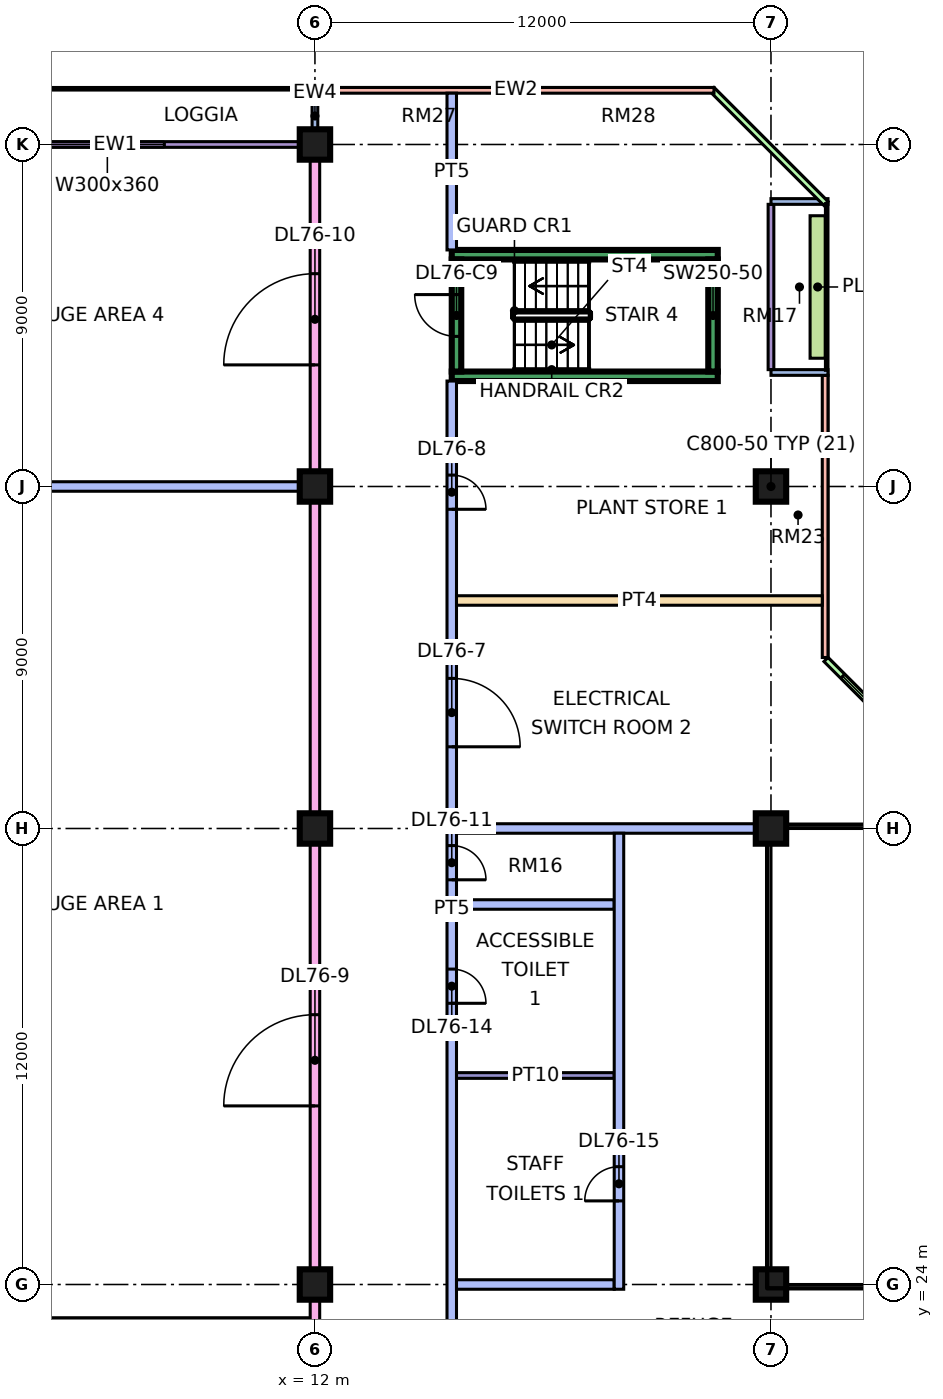
"""IFC4 building model, lengths in metres.
Left out: names, types, materials, properties, quantities, classifications, styles, units other than length and angle.
Written with IfcOpenShell. Run it as: python <this file> out.ifc"""

import sys

from ifc_helpers import new_model, si_unit, direction, frame, frame_2d, origin, origin_2d, place, context, subcontext, project, spatial, rectangle, extrude, element, fill, save


model = new_model("IFC4")
c1 = context("Model", 3, precision=1e-05, world=origin(), true_north=direction((0.0, 1.0)))
c2 = subcontext(c1, "Body", "Model", "MODEL_VIEW")
j1 = project(units=[si_unit("LENGTHUNIT", "METRE"), si_unit("PLANEANGLEUNIT", "RADIAN")], contexts=[c1])
p1 = place(None, origin())
s1 = spatial("IfcSite", under=j1, at=p1, CompositionType="ELEMENT")
p2 = place(p1, origin())
s2 = spatial("IfcBuilding", under=s1, at=p2, CompositionType="ELEMENT")
p3 = place(p2, frame((0.0, 0.0, 322.15)))
s3 = spatial("IfcBuildingStorey", under=s2, at=p3, CompositionType="ELEMENT", Elevation=322.15)
for number, where, z_axis, x_axis in (
    (1, (12.0, 24.0, 0.0), (0.0, 0.0, 1.0), (1.0, 0.0, 0.0)),
    (2, (12.0, 36.0, 0.0), (0.0, 0.0, 1.0), (1.0, 0.0, 0.0)),
    (3, (12.0, 45.0, 0.0), (0.0, 0.0, 1.0), (1.0, 0.0, 0.0)),
    (4, (12.0, 54.0, 0.0), (0.0, 0.0, 1.0), (1.0, 0.0, 0.0)),
    (5, (24.0, 24.0, 0.0), (0.0, 0.0, 1.0), (1.0, 0.0, 0.0)),
    (6, (24.0, 36.0, 0.0), (0.0, 0.0, 1.0), (1.0, 0.0, 0.0)),
    (7, (24.0, 45.0, 0.0), (0.0, 0.0, 1.0), (1.0, 0.0, 0.0)),
):
    element("IfcColumn", number, at=place(p3, frame(where, z_axis=z_axis, x_axis=x_axis)), inside=s3, PredefinedType="COLUMN", context=c2, shape_type="SweptSolid", body=[
        extrude(rectangle(XDim=0.8, YDim=0.8, at=origin_2d()), origin(), (0.0, 0.0, 1.0), 5.5),
    ])
for number, where, z_axis, x_axis in (
    (8, (15.6, 47.9, 0.0), (0.0, 0.0, 1.0), (1.0, 0.0, 0.0)),
    (9, (15.6, 51.1, 0.0), (0.0, 0.0, 1.0), (1.0, 0.0, 0.0)),
):
    element("IfcWall", number, at=place(p3, frame(where, z_axis=z_axis, x_axis=x_axis)), inside=s3, PredefinedType="SHEAR", context=c2, shape_type="SweptSolid", body=[
        extrude(rectangle(XDim=7.0, YDim=0.25, at=frame_2d((3.5, 0.0))), origin(), (0.0, 0.0, 1.0), 5.5),
    ])
p4 = place(p3, frame((15.725, 48.025, 0.0), z_axis=(0.0, 0.0, 1.0), x_axis=(0.0, 1.0, 0.0)))
e10 = element("IfcWall", 10, at=p4, inside=s3, PredefinedType="SHEAR", context=c2, shape_type="SweptSolid", body=[
    extrude(rectangle(XDim=2.95, YDim=0.25, at=frame_2d((1.475, 0.0))), origin(), (0.0, 0.0, 1.0), 5.5),
])
p5 = place(p4, frame((0.925, 0.0, 0.0)))
e11 = element("IfcOpeningElement", 11, at=p5, cuts=e10, PredefinedType="OPENING", context=c2, shape_type="SweptSolid", body=[
    extrude(rectangle(XDim=1.1, YDim=2.2, at=frame_2d((0.55, 1.1))), frame((0.0, 0.135, 0.0), z_axis=(0.0, -1.0, 0.0), x_axis=(1.0, 0.0, 0.0)), (0.0, 0.0, 1.0), 0.27),
])
p6 = place(p3, frame((22.475, 48.025, 0.0), z_axis=(0.0, 0.0, 1.0), x_axis=(0.0, 1.0, 0.0)))
e12 = element("IfcWall", 12, at=p6, inside=s3, PredefinedType="SHEAR", context=c2, shape_type="SweptSolid", body=[
    extrude(rectangle(XDim=2.95, YDim=0.25, at=frame_2d((1.475, 0.0))), origin(), (0.0, 0.0, 1.0), 5.5),
])
p7 = place(p3, frame((28.447, 37.447, 0.0), z_axis=(0.0, 0.0, 1.0), x_axis=(-0.707106781187, 0.707106781187, 0.0)))
e13 = element("IfcWall", 13, at=p7, inside=s3, PredefinedType="SOLIDWALL", context=c2, shape_type="SweptSolid", body=[
    extrude(rectangle(XDim=4.243, YDim=0.15, at=frame_2d((2.121, 0.0))), origin(), (0.0, 0.0, 1.0), 5.05),
])
p8 = place(p7, frame((0.621, 0.0, 0.45)))
e14 = element("IfcOpeningElement", 14, at=p8, cuts=e13, PredefinedType="OPENING", context=c2, shape_type="SweptSolid", body=[
    extrude(rectangle(XDim=3.0, YDim=3.6, at=frame_2d((1.5, 1.8))), frame((0.0, 0.085, 0.0), z_axis=(0.0, -1.0, 0.0), x_axis=(1.0, 0.0, 0.0)), (0.0, 0.0, 1.0), 0.17),
])
p9 = place(p3, frame((25.425, 40.5, 0.0), z_axis=(0.0, 0.0, 1.0), x_axis=(0.0, 1.0, 0.0)))
e15 = element("IfcWall", 15, at=p9, inside=s3, PredefinedType="SOLIDWALL", context=c2, shape_type="SweptSolid", body=[
    extrude(rectangle(XDim=7.425, YDim=0.15, at=frame_2d((3.712, 0.0))), origin(), (0.0, 0.0, 1.0), 5.05),
])
p10 = place(p3, frame((24.0, 48.075, 0.0), z_axis=(0.0, 0.0, 1.0), x_axis=(0.0, 1.0, 0.0)))
e16 = element("IfcWall", 16, at=p10, inside=s3, PredefinedType="SOLIDWALL", context=c2, shape_type="SweptSolid", body=[
    extrude(rectangle(XDim=4.35, YDim=0.15, at=frame_2d((2.175, 0.0))), origin(), (0.0, 0.0, 1.0), 5.05),
])
for number, where, z_axis, x_axis in (
    (17, (25.5, 48.0, 0.0), (0.0, 0.0, 1.0), (-1.0, 0.0, 0.0)),
    (18, (25.5, 52.5, 0.0), (0.0, 0.0, 1.0), (-1.0, 0.0, 0.0)),
):
    element("IfcWall", number, at=place(p3, frame(where, z_axis=z_axis, x_axis=x_axis)), inside=s3, PredefinedType="SOLIDWALL", context=c2, shape_type="SweptSolid", body=[
        extrude(rectangle(XDim=1.5, YDim=0.15, at=frame_2d((0.75, 0.0))), origin(), (0.0, 0.0, 1.0), 5.05),
    ])
p11 = place(p3, frame((25.447, 52.447, 0.0), z_axis=(0.0, 0.0, 1.0), x_axis=(-0.707106781187, 0.707106781187, 0.0)))
e19 = element("IfcWall", 19, at=p11, inside=s3, PredefinedType="SOLIDWALL", context=c2, shape_type="SweptSolid", body=[
    extrude(rectangle(XDim=4.243, YDim=0.15, at=frame_2d((2.121, 0.0))), origin(), (0.0, 0.0, 1.0), 5.05),
])
p12 = place(p3, frame((22.5, 55.425, 0.0), z_axis=(0.0, 0.0, 1.0), x_axis=(-1.0, 0.0, 0.0)))
e20 = element("IfcWall", 20, at=p12, inside=s3, PredefinedType="SOLIDWALL", context=c2, shape_type="SweptSolid", body=[
    extrude(rectangle(XDim=10.425, YDim=0.15, at=frame_2d((5.212, 0.0))), origin(), (0.0, 0.0, 1.0), 5.05),
])
p13 = place(p3, frame((11.925, 54.0, 0.0), z_axis=(0.0, 0.0, 1.0), x_axis=(-1.0, 0.0, 0.0)))
e21 = element("IfcWall", 21, at=p13, inside=s3, PredefinedType="SOLIDWALL", context=c2, shape_type="SweptSolid", body=[
    extrude(rectangle(XDim=10.35, YDim=0.15, at=frame_2d((5.175, 0.0))), origin(), (0.0, 0.0, 1.0), 5.05),
])
p14 = place(p13, frame((3.887, 0.0, 0.45)))
e22 = element("IfcOpeningElement", 22, at=p14, cuts=e21, PredefinedType="OPENING", context=c2, shape_type="SweptSolid", body=[
    extrude(rectangle(XDim=3.0, YDim=3.6, at=frame_2d((1.5, 1.8))), frame((0.0, 0.085, 0.0), z_axis=(0.0, -1.0, 0.0), x_axis=(1.0, 0.0, 0.0)), (0.0, 0.0, 1.0), 0.17),
])
p15 = place(p3, frame((12.0, 55.5, 0.0), z_axis=(0.0, 0.0, 1.0), x_axis=(0.0, -1.0, 0.0)))
e23 = element("IfcWall", 23, at=p15, inside=s3, PredefinedType="SOLIDWALL", context=c2, shape_type="SweptSolid", body=[
    extrude(rectangle(XDim=1.5, YDim=0.15, at=frame_2d((0.75, 0.0))), origin(), (0.0, 0.0, 1.0), 5.05),
])
p16 = place(p3, frame((25.229, 48.375, 0.0), z_axis=(0.0, 0.0, 1.0), x_axis=(0.0, 1.0, 0.0)))
e24 = element("IfcWall", 24, at=p16, inside=s3, PredefinedType="SOLIDWALL", context=c2, shape_type="SweptSolid", body=[
    extrude(rectangle(XDim=3.75, YDim=0.4, at=frame_2d((1.875, 0.0))), origin(), (0.0, 0.0, 1.0), 0.7),
])
p17 = place(p3, frame((-1.35, 23.0, 0.0), z_axis=(0.0, 0.0, 1.0), x_axis=(1.0, 0.0, 0.0)))
e25 = element("IfcWall", 25, at=p17, inside=s3, PredefinedType="PARTITIONING", context=c2, shape_type="SweptSolid", body=[
    extrude(rectangle(XDim=13.225, YDim=0.25, at=frame_2d((6.613, 0.0))), origin(), (0.0, 0.0, 1.0), 5.05),
])
p18 = place(p3, frame((0.0, 45.0, 0.0), z_axis=(0.0, 0.0, 1.0), x_axis=(1.0, 0.0, 0.0)))
e26 = element("IfcWall", 26, at=p18, inside=s3, PredefinedType="PARTITIONING", context=c2, shape_type="SweptSolid", body=[
    extrude(rectangle(XDim=11.875, YDim=0.25, at=frame_2d((5.938, 0.0))), origin(), (0.0, 0.0, 1.0), 5.05),
])
p19 = place(p3, frame((12.0, 22.875, 0.0), z_axis=(0.0, 0.0, 1.0), x_axis=(0.0, 1.0, 0.0)))
e27 = element("IfcWall", 27, at=p19, inside=s3, PredefinedType="PARTITIONING", context=c2, shape_type="SweptSolid", body=[
    extrude(rectangle(XDim=31.125, YDim=0.25, at=frame_2d((15.562, 0.0))), origin(), (0.0, 0.0, 1.0), 2.45),
])
p20 = place(p19, frame((5.825, 0.0, 0.0)))
e28 = element("IfcOpeningElement", 28, at=p20, cuts=e27, PredefinedType="OPENING", context=c2, shape_type="SweptSolid", body=[
    extrude(rectangle(XDim=2.4, YDim=2.1, at=frame_2d((1.2, 1.05))), frame((0.0, 0.135, 0.0), z_axis=(0.0, -1.0, 0.0), x_axis=(1.0, 0.0, 0.0)), (0.0, 0.0, 1.0), 0.27),
])
p21 = place(p19, frame((25.325, 0.0, 0.0)))
e29 = element("IfcOpeningElement", 29, at=p21, cuts=e27, PredefinedType="OPENING", context=c2, shape_type="SweptSolid", body=[
    extrude(rectangle(XDim=2.4, YDim=2.1, at=frame_2d((1.2, 1.05))), frame((0.0, 0.135, 0.0), z_axis=(0.0, -1.0, 0.0), x_axis=(1.0, 0.0, 0.0)), (0.0, 0.0, 1.0), 0.27),
])
p22 = place(p3, frame((15.6, 20.0, 0.0), z_axis=(0.0, 0.0, 1.0), x_axis=(0.0, 1.0, 0.0)))
e30 = element("IfcWall", 30, at=p22, inside=s3, PredefinedType="PARTITIONING", context=c2, shape_type="SweptSolid", body=[
    extrude(rectangle(XDim=27.775, YDim=0.25, at=frame_2d((13.887, 0.0))), origin(), (0.0, 0.0, 1.0), 5.05),
])
p23 = place(p22, frame((18.15, 0.0, 0.0)))
e31 = element("IfcOpeningElement", 31, at=p23, cuts=e30, PredefinedType="OPENING", context=c2, shape_type="SweptSolid", body=[
    extrude(rectangle(XDim=1.8, YDim=2.1, at=frame_2d((0.9, 1.05))), frame((0.0, 0.135, 0.0), z_axis=(0.0, -1.0, 0.0), x_axis=(1.0, 0.0, 0.0)), (0.0, 0.0, 1.0), 0.27),
])
p24 = place(p22, frame((24.4, 0.0, 0.0)))
e32 = element("IfcOpeningElement", 32, at=p24, cuts=e30, PredefinedType="OPENING", context=c2, shape_type="SweptSolid", body=[
    extrude(rectangle(XDim=0.9, YDim=2.1, at=frame_2d((0.45, 1.05))), frame((0.0, 0.135, 0.0), z_axis=(0.0, -1.0, 0.0), x_axis=(1.0, 0.0, 0.0)), (0.0, 0.0, 1.0), 0.27),
])
p25 = place(p22, frame((14.65, 0.0, 0.0)))
e33 = element("IfcOpeningElement", 33, at=p25, cuts=e30, PredefinedType="OPENING", context=c2, shape_type="SweptSolid", body=[
    extrude(rectangle(XDim=0.9, YDim=2.1, at=frame_2d((0.45, 1.05))), frame((0.0, 0.135, 0.0), z_axis=(0.0, -1.0, 0.0), x_axis=(1.0, 0.0, 0.0)), (0.0, 0.0, 1.0), 0.27),
])
p26 = place(p22, frame((11.4, 0.0, 0.0)))
e34 = element("IfcOpeningElement", 34, at=p26, cuts=e30, PredefinedType="OPENING", context=c2, shape_type="SweptSolid", body=[
    extrude(rectangle(XDim=0.9, YDim=2.1, at=frame_2d((0.45, 1.05))), frame((0.0, 0.135, 0.0), z_axis=(0.0, -1.0, 0.0), x_axis=(1.0, 0.0, 0.0)), (0.0, 0.0, 1.0), 0.27),
])
p27 = place(p3, frame((15.6, 51.225, 0.0), z_axis=(0.0, 0.0, 1.0), x_axis=(0.0, 1.0, 0.0)))
e35 = element("IfcWall", 35, at=p27, inside=s3, PredefinedType="PARTITIONING", context=c2, shape_type="SweptSolid", body=[
    extrude(rectangle(XDim=4.125, YDim=0.25, at=frame_2d((2.062, 0.0))), origin(), (0.0, 0.0, 1.0), 5.05),
])
p28 = place(p3, frame((15.725, 24.0, 0.0), z_axis=(0.0, 0.0, 1.0), x_axis=(1.0, 0.0, 0.0)))
e36 = element("IfcWall", 36, at=p28, inside=s3, PredefinedType="PARTITIONING", context=c2, shape_type="SweptSolid", body=[
    extrude(rectangle(XDim=4.15, YDim=0.25, at=frame_2d((2.075, 0.0))), origin(), (0.0, 0.0, 1.0), 5.05),
])
p29 = place(p3, frame((15.725, 29.5, 0.0), z_axis=(0.0, 0.0, 1.0), x_axis=(1.0, 0.0, 0.0)))
e37 = element("IfcWall", 37, at=p29, inside=s3, PredefinedType="PARTITIONING", context=c2, shape_type="SweptSolid", body=[
    extrude(rectangle(XDim=4.15, YDim=0.15, at=frame_2d((2.075, 0.0))), origin(), (0.0, 0.0, 1.0), 5.05),
])
p30 = place(p3, frame((15.725, 34.0, 0.0), z_axis=(0.0, 0.0, 1.0), x_axis=(1.0, 0.0, 0.0)))
e38 = element("IfcWall", 38, at=p30, inside=s3, PredefinedType="PARTITIONING", context=c2, shape_type="SweptSolid", body=[
    extrude(rectangle(XDim=4.15, YDim=0.25, at=frame_2d((2.075, 0.0))), origin(), (0.0, 0.0, 1.0), 5.05),
])
p31 = place(p3, frame((15.725, 36.0, 0.0), z_axis=(0.0, 0.0, 1.0), x_axis=(1.0, 0.0, 0.0)))
e39 = element("IfcWall", 39, at=p31, inside=s3, PredefinedType="PARTITIONING", context=c2, shape_type="SweptSolid", body=[
    extrude(rectangle(XDim=8.275, YDim=0.25, at=frame_2d((4.137, 0.0))), origin(), (0.0, 0.0, 1.0), 5.05),
])
p32 = place(p3, frame((15.725, 42.0, 0.0), z_axis=(0.0, 0.0, 1.0), x_axis=(1.0, 0.0, 0.0)))
e40 = element("IfcWall", 40, at=p32, inside=s3, PredefinedType="PARTITIONING", context=c2, shape_type="SweptSolid", body=[
    extrude(rectangle(XDim=9.625, YDim=0.25, at=frame_2d((4.812, 0.0))), origin(), (0.0, 0.0, 1.0), 5.05),
])
p33 = place(p3, frame((20.0, 23.875, 0.0), z_axis=(0.0, 0.0, 1.0), x_axis=(0.0, 1.0, 0.0)))
e41 = element("IfcWall", 41, at=p33, inside=s3, PredefinedType="PARTITIONING", context=c2, shape_type="SweptSolid", body=[
    extrude(rectangle(XDim=12.0, YDim=0.25, at=frame_2d((6.0, 0.0))), origin(), (0.0, 0.0, 1.0), 5.05),
])
p34 = place(p33, frame((2.325, 0.0, 0.0)))
e42 = element("IfcOpeningElement", 42, at=p34, cuts=e41, PredefinedType="OPENING", context=c2, shape_type="SweptSolid", body=[
    extrude(rectangle(XDim=0.9, YDim=2.1, at=frame_2d((0.45, 1.05))), frame((0.0, 0.135, 0.0), z_axis=(0.0, -1.0, 0.0), x_axis=(1.0, 0.0, 0.0)), (0.0, 0.0, 1.0), 0.27),
])
p35 = place(p8, origin())
e43 = element("IfcWindow", 43, at=p35, inside=s3, PartitioningType="SINGLE_PANEL", PredefinedType="WINDOW", context=c2, shape_type="SweptSolid", body=[
    extrude(rectangle(XDim=3.0, YDim=3.6, at=frame_2d((1.5, 1.8))), frame((0.0, 0.03, 0.0), z_axis=(0.0, -1.0, 0.0), x_axis=(1.0, 0.0, 0.0)), (0.0, 0.0, 1.0), 0.06),
])
fill(e14, e43)
p36 = place(p14, origin())
e44 = element("IfcWindow", 44, at=p36, inside=s3, PartitioningType="SINGLE_PANEL", PredefinedType="WINDOW", context=c2, shape_type="SweptSolid", body=[
    extrude(rectangle(XDim=3.0, YDim=3.6, at=frame_2d((1.5, 1.8))), frame((0.0, 0.03, 0.0), z_axis=(0.0, -1.0, 0.0), x_axis=(1.0, 0.0, 0.0)), (0.0, 0.0, 1.0), 0.06),
])
fill(e22, e44)
p37 = place(p5, frame((1.1, 0.0, 0.0), z_axis=(0.0, 0.0, 1.0), x_axis=(-1.0, 0.0, 0.0)))
e45 = element("IfcDoor", 45, at=p37, inside=s3, OperationType="SINGLE_SWING_RIGHT", PredefinedType="DOOR", context=c2, shape_type="SweptSolid", body=[
    extrude(rectangle(XDim=1.1, YDim=2.2, at=frame_2d((0.55, 1.1))), frame((0.0, 0.025, 0.0), z_axis=(0.0, -1.0, 0.0), x_axis=(1.0, 0.0, 0.0)), (0.0, 0.0, 1.0), 0.05),
])
fill(e11, e45)
p38 = place(p23, frame((1.8, 0.0, 0.0), z_axis=(0.0, 0.0, 1.0), x_axis=(-1.0, 0.0, 0.0)))
e46 = element("IfcDoor", 46, at=p38, inside=s3, OperationType="DOUBLE_DOOR_SINGLE_SWING", PredefinedType="DOOR", context=c2, shape_type="SweptSolid", body=[
    extrude(rectangle(XDim=1.8, YDim=2.1, at=frame_2d((0.9, 1.05))), frame((0.0, 0.025, 0.0), z_axis=(0.0, -1.0, 0.0), x_axis=(1.0, 0.0, 0.0)), (0.0, 0.0, 1.0), 0.05),
])
fill(e31, e46)
p39 = place(p24, frame((0.9, 0.0, 0.0), z_axis=(0.0, 0.0, 1.0), x_axis=(-1.0, 0.0, 0.0)))
e47 = element("IfcDoor", 47, at=p39, inside=s3, OperationType="SINGLE_SWING_LEFT", PredefinedType="DOOR", context=c2, shape_type="SweptSolid", body=[
    extrude(rectangle(XDim=0.9, YDim=2.1, at=frame_2d((0.45, 1.05))), frame((0.0, 0.025, 0.0), z_axis=(0.0, -1.0, 0.0), x_axis=(1.0, 0.0, 0.0)), (0.0, 0.0, 1.0), 0.05),
])
fill(e32, e47)
p40 = place(p20, origin())
e48 = element("IfcDoor", 48, at=p40, inside=s3, OperationType="DOUBLE_DOOR_SINGLE_SWING", PredefinedType="DOOR", context=c2, shape_type="SweptSolid", body=[
    extrude(rectangle(XDim=2.4, YDim=2.1, at=frame_2d((1.2, 1.05))), frame((0.0, 0.025, 0.0), z_axis=(0.0, -1.0, 0.0), x_axis=(1.0, 0.0, 0.0)), (0.0, 0.0, 1.0), 0.05),
])
fill(e28, e48)
p41 = place(p21, origin())
e49 = element("IfcDoor", 49, at=p41, inside=s3, OperationType="DOUBLE_DOOR_SINGLE_SWING", PredefinedType="DOOR", context=c2, shape_type="SweptSolid", body=[
    extrude(rectangle(XDim=2.4, YDim=2.1, at=frame_2d((1.2, 1.05))), frame((0.0, 0.025, 0.0), z_axis=(0.0, -1.0, 0.0), x_axis=(1.0, 0.0, 0.0)), (0.0, 0.0, 1.0), 0.05),
])
fill(e29, e49)
p42 = place(p25, frame((0.9, 0.0, 0.0), z_axis=(0.0, 0.0, 1.0), x_axis=(-1.0, 0.0, 0.0)))
e50 = element("IfcDoor", 50, at=p42, inside=s3, OperationType="SINGLE_SWING_LEFT", PredefinedType="DOOR", context=c2, shape_type="SweptSolid", body=[
    extrude(rectangle(XDim=0.9, YDim=2.1, at=frame_2d((0.45, 1.05))), frame((0.0, 0.025, 0.0), z_axis=(0.0, -1.0, 0.0), x_axis=(1.0, 0.0, 0.0)), (0.0, 0.0, 1.0), 0.05),
])
fill(e33, e50)
p43 = place(p26, frame((0.9, 0.0, 0.0), z_axis=(0.0, 0.0, 1.0), x_axis=(-1.0, 0.0, 0.0)))
e51 = element("IfcDoor", 51, at=p43, inside=s3, OperationType="SINGLE_SWING_LEFT", PredefinedType="DOOR", context=c2, shape_type="SweptSolid", body=[
    extrude(rectangle(XDim=0.9, YDim=2.1, at=frame_2d((0.45, 1.05))), frame((0.0, 0.025, 0.0), z_axis=(0.0, -1.0, 0.0), x_axis=(1.0, 0.0, 0.0)), (0.0, 0.0, 1.0), 0.05),
])
fill(e34, e51)
p44 = place(p34, origin())
e52 = element("IfcDoor", 52, at=p44, inside=s3, OperationType="SINGLE_SWING_LEFT", PredefinedType="DOOR", context=c2, shape_type="SweptSolid", body=[
    extrude(rectangle(XDim=0.9, YDim=2.1, at=frame_2d((0.45, 1.05))), frame((0.0, 0.025, 0.0), z_axis=(0.0, -1.0, 0.0), x_axis=(1.0, 0.0, 0.0)), (0.0, 0.0, 1.0), 0.05),
])
fill(e42, e52)
save(model, sys.argv[1])
